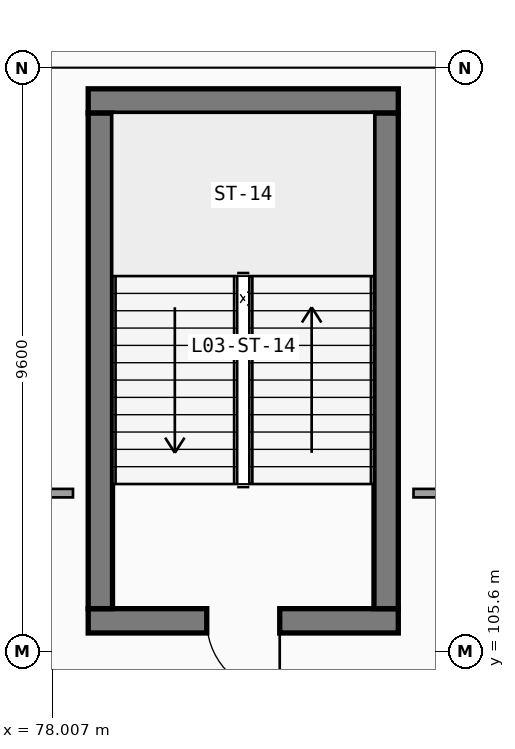
"""IFC4 building model, lengths in metres.
Left out: names, types, materials, properties, quantities, classifications, styles, units other than length and angle.
Written with IfcOpenShell. Run it as: python <this file> out.ifc"""

import sys

from ifc_helpers import new_model, si_unit, direction, frame, frame_2d, origin, place, context, subcontext, project, spatial, rectangle, extrude, element, fill, save


model = new_model("IFC4")
c1 = context("Model", 3, precision=1e-05, world=origin(), true_north=direction((0.0, 1.0)))
c2 = subcontext(c1, "Body", "Model", "MODEL_VIEW")
j1 = project(units=[si_unit("LENGTHUNIT", "METRE"), si_unit("PLANEANGLEUNIT", "RADIAN")], contexts=[c1])
p1 = place(None, origin())
s1 = spatial("IfcSite", under=j1, at=p1, CompositionType="ELEMENT")
p2 = place(p1, origin())
s2 = spatial("IfcBuilding", under=s1, at=p2, CompositionType="ELEMENT")
p3 = place(p2, frame((0.0, 0.0, 14.1)))
s3 = spatial("IfcBuildingStorey", under=s2, at=p3, CompositionType="ELEMENT", Elevation=14.1)
p4 = place(p3, frame((78.6, 106.1, 0.0), z_axis=(0.0, 0.0, 1.0), x_axis=(1.0, 0.0, 0.0)))
e1 = element("IfcWall", 1, at=p4, inside=s3, PredefinedType="SHEAR", context=c2, shape_type="SweptSolid", body=[
    extrude(rectangle(XDim=5.1, YDim=0.4, at=frame_2d((2.55, 0.0))), origin(), (0.0, 0.0, 1.0), 4.24),
])
p5 = place(p4, frame((3.15, 0.0, 0.0), z_axis=(0.0, 0.0, 1.0), x_axis=(-1.0, 0.0, 0.0)))
e2 = element("IfcOpeningElement", 2, at=p5, cuts=e1, PredefinedType="OPENING", context=c2, shape_type="SweptSolid", body=[
    extrude(rectangle(XDim=1.2, YDim=2.2, at=frame_2d((0.6, 1.1))), frame((0.0, 0.21, 0.0), z_axis=(0.0, -1.0, 0.0), x_axis=(1.0, 0.0, 0.0)), (0.0, 0.0, 1.0), 0.42),
])
p6 = place(p3, frame((83.7, 114.65, 0.0), z_axis=(0.0, 0.0, 1.0), x_axis=(-1.0, 0.0, 0.0)))
e3 = element("IfcWall", 3, at=p6, inside=s3, PredefinedType="SHEAR", context=c2, shape_type="SweptSolid", body=[
    extrude(rectangle(XDim=5.1, YDim=0.4, at=frame_2d((2.55, 0.0))), origin(), (0.0, 0.0, 1.0), 4.24),
])
for number, where, z_axis, x_axis in (
    (4, (78.8, 114.45, 0.0), (0.0, 0.0, 1.0), (0.0, -1.0, 0.0)),
    (5, (83.5, 106.3, 0.0), (0.0, 0.0, 1.0), (0.0, 1.0, 0.0)),
):
    element("IfcWall", number, at=place(p3, frame(where, z_axis=z_axis, x_axis=x_axis)), inside=s3, PredefinedType="SHEAR", context=c2, shape_type="SweptSolid", body=[
        extrude(rectangle(XDim=8.15, YDim=0.4, at=frame_2d((4.075, 0.0))), origin(), (0.0, 0.0, 1.0), 4.24),
    ])
p7 = place(p3, frame((76.0, 108.2, 0.0), z_axis=(0.0, 0.0, 1.0), x_axis=(1.0, 0.0, 0.0)))
e6 = element("IfcWall", 6, at=p7, inside=s3, PredefinedType="PARTITIONING", context=c2, shape_type="SweptSolid", body=[
    extrude(rectangle(XDim=2.35, YDim=0.14, at=frame_2d((1.175, 0.0))), origin(), (0.0, 0.0, 1.0), 3.638),
])
p8 = place(p3, frame((83.95, 108.2, 0.0), z_axis=(0.0, 0.0, 1.0), x_axis=(1.0, 0.0, 0.0)))
e7 = element("IfcWall", 7, at=p8, inside=s3, PredefinedType="PARTITIONING", context=c2, shape_type="SweptSolid", body=[
    extrude(rectangle(XDim=3.67, YDim=0.14, at=frame_2d((1.835, 0.0))), origin(), (0.0, 0.0, 1.0), 3.638),
])
p9 = place(p5, origin())
e8 = element("IfcDoor", 8, at=p9, inside=s3, OperationType="SINGLE_SWING_LEFT", PredefinedType="DOOR", context=c2, shape_type="SweptSolid", body=[
    extrude(rectangle(XDim=1.2, YDim=2.2, at=frame_2d((0.6, 1.1))), frame((0.0, 0.025, 0.0), z_axis=(0.0, -1.0, 0.0), x_axis=(1.0, 0.0, 0.0)), (0.0, 0.0, 1.0), 0.05),
])
fill(e2, e8)
save(model, sys.argv[1])
